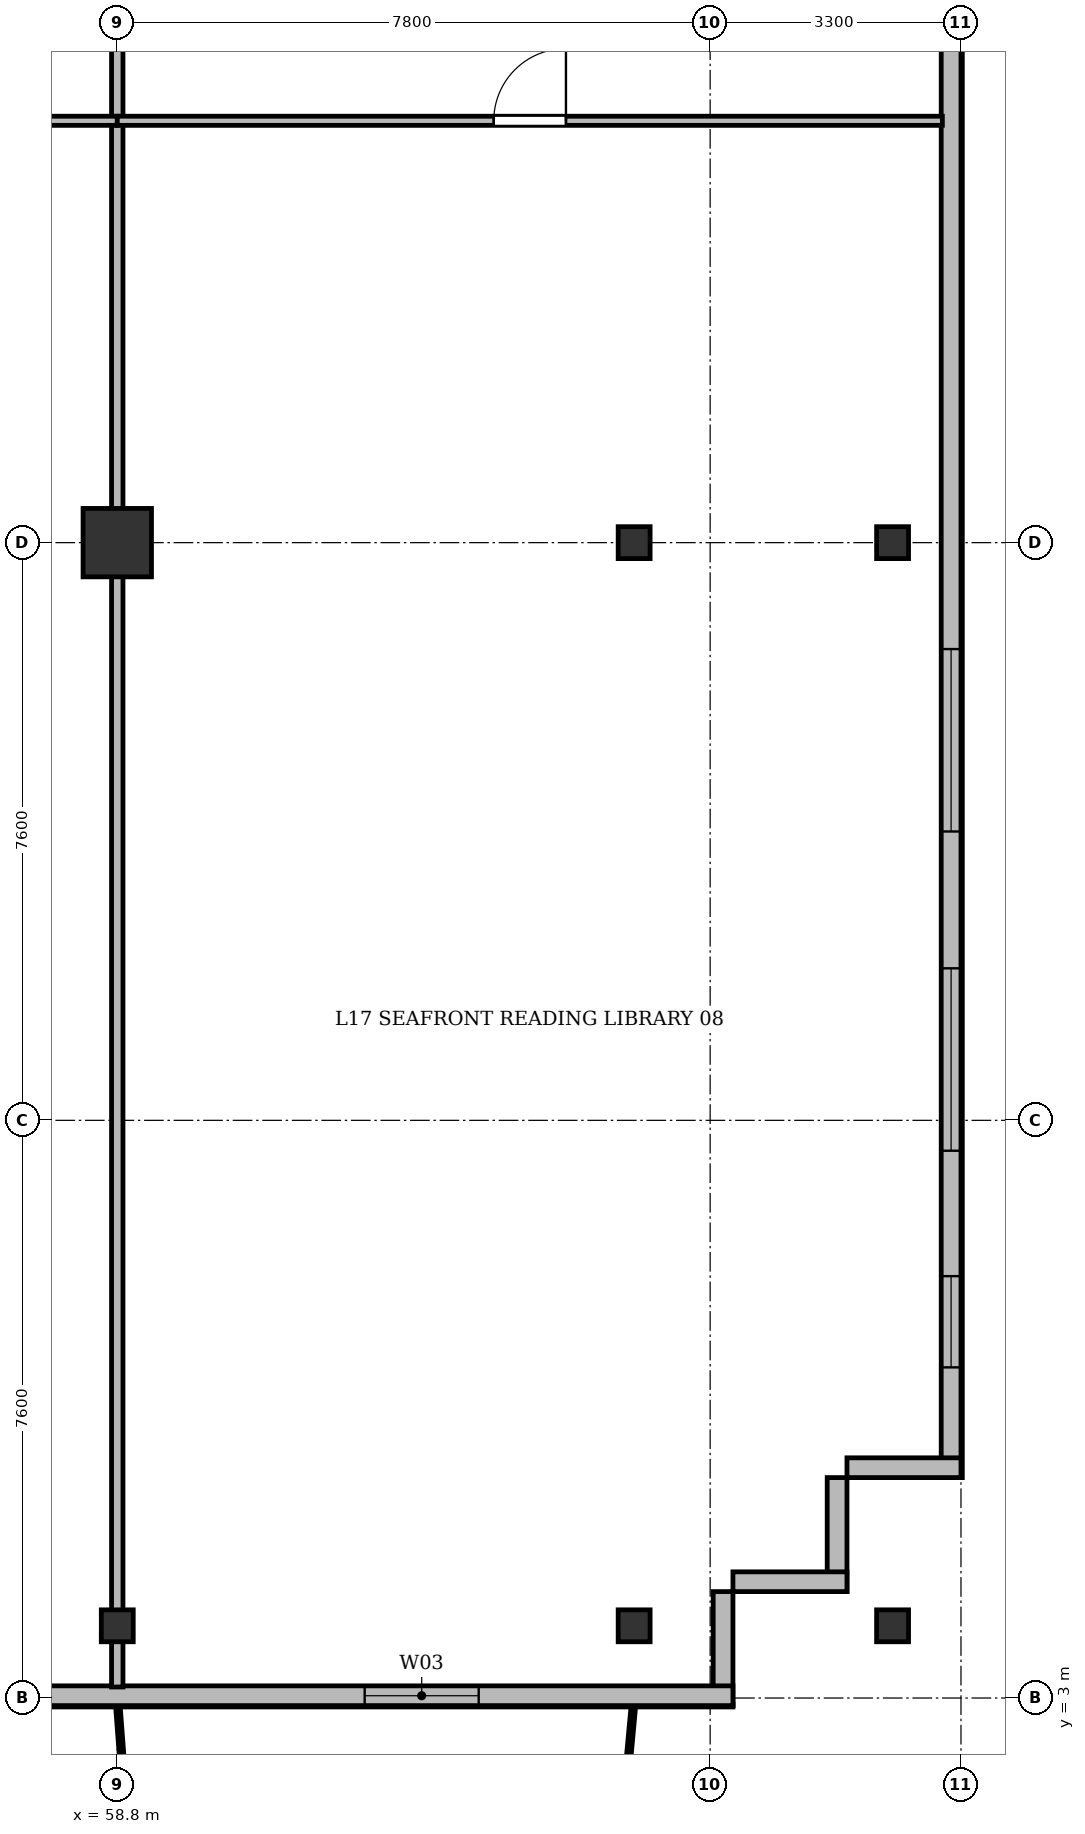
"""IFC4 building model, lengths in metres.
Left out: names, types, materials, properties, quantities, classifications, styles, units other than length and angle.
Written with IfcOpenShell. Run it as: python <this file> out.ifc"""

import sys

from ifc_helpers import new_model, si_unit, direction, frame, frame_2d, origin, origin_2d, place, context, subcontext, project, spatial, rectangle, i_section, extrude, source, transform, mapped, element, fill, save


model = new_model("IFC4")
c1 = context("Model", 3, precision=1e-05, world=origin(), true_north=direction((0.0, 1.0)))
c2 = subcontext(c1, "Body", "Model", "MODEL_VIEW")
j1 = project(units=[si_unit("LENGTHUNIT", "METRE"), si_unit("PLANEANGLEUNIT", "RADIAN")], contexts=[c1])
p1 = place(None, origin())
s1 = spatial("IfcSite", under=j1, at=p1, CompositionType="ELEMENT")
p2 = place(p1, origin())
s2 = spatial("IfcBuilding", under=s1, at=p2, CompositionType="ELEMENT")
p3 = place(p2, frame((0.0, 0.0, 66.7)))
s3 = spatial("IfcBuildingStorey", under=s2, at=p3, CompositionType="ELEMENT", Elevation=66.7)
m1 = source(origin(), c2, "Body", "SweptSolid", [
    extrude(i_section(OverallWidth=0.42, OverallDepth=0.42, WebThickness=0.026, FlangeThickness=0.04, at=origin_2d()), origin(), (0.0, 0.0, 1.0), 3.6),
])
p4 = place(p3, frame((58.8, 3.95, 0.0), z_axis=(0.0, 0.0, 1.0), x_axis=(1.0, 0.0, 0.0)))
e1 = element("IfcColumn", 1, at=p4, inside=s3, PredefinedType="COLUMN", context=c2, shape_type="MappedRepresentation", body=[
    mapped(m1, transform((0.0, 0.0, 0.0), x_axis=(1.0, 0.0, 0.0), y_axis=(0.0, 1.0, 0.0), z_axis=(0.0, 0.0, 1.0), scale=1.0)),
])
m2 = source(origin(), c2, "Body", "SweptSolid", [
    extrude(rectangle(XDim=0.9, YDim=0.9, at=origin_2d()), origin(), (0.0, 0.0, 1.0), 3.6),
])
p5 = place(p3, frame((58.8, 18.2, 0.0), z_axis=(0.0, 0.0, 1.0), x_axis=(1.0, 0.0, 0.0)))
e2 = element("IfcColumn", 2, at=p5, inside=s3, PredefinedType="COLUMN", context=c2, shape_type="MappedRepresentation", body=[
    mapped(m2, transform((0.0, 0.0, 0.0), x_axis=(1.0, 0.0, 0.0), y_axis=(0.0, 1.0, 0.0), z_axis=(0.0, 0.0, 1.0), scale=1.0)),
])
for number, where, z_axis, x_axis in (
    (3, (65.6, 3.95, 0.0), (0.0, 0.0, 1.0), (1.0, 0.0, 0.0)),
    (4, (65.6, 18.2, 0.0), (0.0, 0.0, 1.0), (1.0, 0.0, 0.0)),
    (5, (69.0, 3.95, 0.0), (0.0, 0.0, 1.0), (1.0, 0.0, 0.0)),
    (6, (69.0, 18.2, 0.0), (0.0, 0.0, 1.0), (1.0, 0.0, 0.0)),
):
    element("IfcColumn", number, at=place(p3, frame(where, z_axis=z_axis, x_axis=x_axis)), inside=s3, PredefinedType="COLUMN", context=c2, shape_type="MappedRepresentation", body=[
        mapped(m1, transform((0.0, 0.0, 0.0), x_axis=(1.0, 0.0, 0.0), y_axis=(0.0, 1.0, 0.0), z_axis=(0.0, 0.0, 1.0), scale=1.0)),
    ])
p6 = place(p3, frame((69.77, 45.5, 0.0), z_axis=(0.0, 0.0, 1.0), x_axis=(0.0, -1.0, 0.0)))
e7 = element("IfcWall", 7, at=p6, inside=s3, PredefinedType="SOLIDWALL", context=c2, shape_type="SweptSolid", body=[
    extrude(rectangle(XDim=39.6, YDim=0.26, at=frame_2d((19.8, 0.0))), origin(), (0.0, 0.0, 1.0), 3.34),
])
p7 = place(p6, frame((36.95, 0.0, 0.92)))
e8 = element("IfcOpeningElement", 8, at=p7, cuts=e7, PredefinedType="OPENING", context=c2, shape_type="SweptSolid", body=[
    extrude(rectangle(XDim=1.2, YDim=1.65, at=frame_2d((0.6, 0.825))), frame((0.0, 0.14, 0.0), z_axis=(0.0, -1.0, 0.0), x_axis=(1.0, 0.0, 0.0)), (0.0, 0.0, 1.0), 0.28),
])
p8 = place(p6, frame((32.9, 0.0, 0.92)))
e9 = element("IfcOpeningElement", 9, at=p8, cuts=e7, PredefinedType="OPENING", context=c2, shape_type="SweptSolid", body=[
    extrude(rectangle(XDim=2.4, YDim=2.1, at=frame_2d((1.2, 1.05))), frame((0.0, 0.14, 0.0), z_axis=(0.0, -1.0, 0.0), x_axis=(1.0, 0.0, 0.0)), (0.0, 0.0, 1.0), 0.28),
])
p9 = place(p6, frame((28.7, 0.0, 0.92)))
e10 = element("IfcOpeningElement", 10, at=p9, cuts=e7, PredefinedType="OPENING", context=c2, shape_type="SweptSolid", body=[
    extrude(rectangle(XDim=2.4, YDim=2.1, at=frame_2d((1.2, 1.05))), frame((0.0, 0.14, 0.0), z_axis=(0.0, -1.0, 0.0), x_axis=(1.0, 0.0, 0.0)), (0.0, 0.0, 1.0), 0.28),
])
p10 = place(p6, frame((7.5, 0.0, 0.92)))
e11 = element("IfcOpeningElement", 11, at=p10, cuts=e7, PredefinedType="OPENING", context=c2, shape_type="SweptSolid", body=[
    extrude(rectangle(XDim=2.4, YDim=2.1, at=frame_2d((1.2, 1.05))), frame((0.0, 0.14, 0.0), z_axis=(0.0, -1.0, 0.0), x_axis=(1.0, 0.0, 0.0)), (0.0, 0.0, 1.0), 0.28),
])
p11 = place(p6, frame((1.15, 0.0, 0.92)))
e12 = element("IfcOpeningElement", 12, at=p11, cuts=e7, PredefinedType="OPENING", context=c2, shape_type="SweptSolid", body=[
    extrude(rectangle(XDim=1.2, YDim=1.65, at=frame_2d((0.6, 0.825))), frame((0.0, 0.14, 0.0), z_axis=(0.0, -1.0, 0.0), x_axis=(1.0, 0.0, 0.0)), (0.0, 0.0, 1.0), 0.28),
])
p12 = place(p3, frame((69.9, 6.03, 0.0), z_axis=(0.0, 0.0, 1.0), x_axis=(-1.0, 0.0, 0.0)))
e13 = element("IfcWall", 13, at=p12, inside=s3, PredefinedType="SOLIDWALL", context=c2, shape_type="SweptSolid", body=[
    extrude(rectangle(XDim=1.5, YDim=0.26, at=frame_2d((0.75, 0.0))), origin(), (0.0, 0.0, 1.0), 2.752),
])
for number, where, z_axis, x_axis in (
    (14, (68.27, 5.9, 0.0), (0.0, 0.0, 1.0), (0.0, -1.0, 0.0)),
    (15, (68.4, 4.53, 0.0), (0.0, 0.0, 1.0), (-1.0, 0.0, 0.0)),
):
    element("IfcWall", number, at=place(p3, frame(where, z_axis=z_axis, x_axis=x_axis)), inside=s3, PredefinedType="SOLIDWALL", context=c2, shape_type="SweptSolid", body=[
        extrude(rectangle(XDim=1.5, YDim=0.26, at=frame_2d((0.75, 0.0))), origin(), (0.0, 0.0, 1.0), 3.34),
    ])
p13 = place(p3, frame((66.77, 4.4, 0.0), z_axis=(0.0, 0.0, 1.0), x_axis=(0.0, -1.0, 0.0)))
e16 = element("IfcWall", 16, at=p13, inside=s3, PredefinedType="SOLIDWALL", context=c2, shape_type="SweptSolid", body=[
    extrude(rectangle(XDim=1.5, YDim=0.26, at=frame_2d((0.75, 0.0))), origin(), (0.0, 0.0, 1.0), 2.69),
])
p14 = place(p3, frame((66.9, 3.03, 0.0), z_axis=(0.0, 0.0, 1.0), x_axis=(-1.0, 0.0, 0.0)))
e17 = element("IfcWall", 17, at=p14, inside=s3, PredefinedType="SOLIDWALL", context=c2, shape_type="SweptSolid", body=[
    extrude(rectangle(XDim=37.3, YDim=0.26, at=frame_2d((18.65, 0.0))), origin(), (0.0, 0.0, 1.0), 3.34),
])
p15 = place(p14, frame((3.345, 0.0, 0.9)))
e18 = element("IfcOpeningElement", 18, at=p15, cuts=e17, PredefinedType="OPENING", context=c2, shape_type="SweptSolid", body=[
    extrude(rectangle(XDim=1.5, YDim=1.75, at=frame_2d((0.75, 0.875))), frame((0.0, 0.14, 0.0), z_axis=(0.0, -1.0, 0.0), x_axis=(1.0, 0.0, 0.0)), (0.0, 0.0, 1.0), 0.28),
])
p16 = place(p14, frame((11.0, 0.0, 0.9)))
e19 = element("IfcOpeningElement", 19, at=p16, cuts=e17, PredefinedType="OPENING", context=c2, shape_type="SweptSolid", body=[
    extrude(rectangle(XDim=2.0, YDim=1.95, at=frame_2d((1.0, 0.975))), frame((0.0, 0.14, 0.0), z_axis=(0.0, -1.0, 0.0), x_axis=(1.0, 0.0, 0.0)), (0.0, 0.0, 1.0), 0.28),
])
p17 = place(p14, frame((17.007, 0.0, 0.0)))
e20 = element("IfcOpeningElement", 20, at=p17, cuts=e17, PredefinedType="OPENING", context=c2, shape_type="SweptSolid", body=[
    extrude(rectangle(XDim=1.2, YDim=2.2, at=frame_2d((0.6, 1.1))), frame((0.0, 0.14, 0.0), z_axis=(0.0, -1.0, 0.0), x_axis=(1.0, 0.0, 0.0)), (0.0, 0.0, 1.0), 0.28),
])
p18 = place(p14, frame((20.4, 0.0, 0.9)))
e21 = element("IfcOpeningElement", 21, at=p18, cuts=e17, PredefinedType="OPENING", context=c2, shape_type="SweptSolid", body=[
    extrude(rectangle(XDim=1.8, YDim=1.8, at=frame_2d((0.9, 0.9))), frame((0.0, 0.14, 0.0), z_axis=(0.0, -1.0, 0.0), x_axis=(1.0, 0.0, 0.0)), (0.0, 0.0, 1.0), 0.28),
])
p19 = place(p14, frame((28.6, 0.0, 0.9)))
e22 = element("IfcOpeningElement", 22, at=p19, cuts=e17, PredefinedType="OPENING", context=c2, shape_type="SweptSolid", body=[
    extrude(rectangle(XDim=2.2, YDim=1.8, at=frame_2d((1.1, 0.9))), frame((0.0, 0.14, 0.0), z_axis=(0.0, -1.0, 0.0), x_axis=(1.0, 0.0, 0.0)), (0.0, 0.0, 1.0), 0.28),
])
p20 = place(p3, frame((58.8, 3.145, 0.0), z_axis=(0.0, 0.0, 1.0), x_axis=(0.0, 1.0, 0.0)))
e23 = element("IfcWall", 23, at=p20, inside=s3, PredefinedType="PARTITIONING", context=c2, shape_type="SweptSolid", body=[
    extrude(rectangle(XDim=24.455, YDim=0.15, at=frame_2d((12.228, 0.0))), origin(), (0.0, 0.0, 1.0), 2.752),
])
p21 = place(p3, frame((51.0, 23.75, 0.0), z_axis=(0.0, 0.0, 1.0), x_axis=(1.0, 0.0, 0.0)))
e24 = element("IfcWall", 24, at=p21, inside=s3, PredefinedType="PARTITIONING", context=c2, shape_type="SweptSolid", body=[
    extrude(rectangle(XDim=7.8, YDim=0.12, at=frame_2d((3.9, 0.0))), origin(), (0.0, 0.0, 1.0), 2.752),
])
p22 = place(p21, frame((3.333, 0.0, 0.0)))
e25 = element("IfcOpeningElement", 25, at=p22, cuts=e24, PredefinedType="OPENING", context=c2, shape_type="SweptSolid", body=[
    extrude(rectangle(XDim=0.95, YDim=2.15, at=frame_2d((0.475, 1.075))), frame((0.0, 0.07, 0.0), z_axis=(0.0, -1.0, 0.0), x_axis=(1.0, 0.0, 0.0)), (0.0, 0.0, 1.0), 0.14),
])
p23 = place(p3, frame((58.8, 23.75, 0.0), z_axis=(0.0, 0.0, 1.0), x_axis=(1.0, 0.0, 0.0)))
e26 = element("IfcWall", 26, at=p23, inside=s3, PredefinedType="PARTITIONING", context=c2, shape_type="SweptSolid", body=[
    extrude(rectangle(XDim=10.855, YDim=0.12, at=frame_2d((5.427, 0.0))), origin(), (0.0, 0.0, 1.0), 2.752),
])
p24 = place(p23, frame((4.953, 0.0, 0.0)))
e27 = element("IfcOpeningElement", 27, at=p24, cuts=e26, PredefinedType="OPENING", context=c2, shape_type="SweptSolid", body=[
    extrude(rectangle(XDim=0.95, YDim=2.15, at=frame_2d((0.475, 1.075))), frame((0.0, 0.07, 0.0), z_axis=(0.0, -1.0, 0.0), x_axis=(1.0, 0.0, 0.0)), (0.0, 0.0, 1.0), 0.14),
])
m3 = source(origin(), c2, "Body", "SweptSolid", [
    extrude(rectangle(XDim=1.2, YDim=1.65, at=frame_2d((0.6, 0.825))), frame((0.0, 0.03, 0.0), z_axis=(0.0, -1.0, 0.0), x_axis=(1.0, 0.0, 0.0)), (0.0, 0.0, 1.0), 0.06),
])
p25 = place(p7, origin())
e28 = element("IfcWindow", 28, at=p25, inside=s3, PartitioningType="SINGLE_PANEL", PredefinedType="WINDOW", context=c2, shape_type="MappedRepresentation", body=[
    mapped(m3, transform((0.0, 0.0, 0.0), x_axis=(1.0, 0.0, 0.0), y_axis=(0.0, 1.0, 0.0), z_axis=(0.0, 0.0, 1.0), scale=1.0)),
])
fill(e8, e28)
m4 = source(origin(), c2, "Body", "SweptSolid", [
    extrude(rectangle(XDim=2.4, YDim=2.1, at=frame_2d((1.2, 1.05))), frame((0.0, 0.03, 0.0), z_axis=(0.0, -1.0, 0.0), x_axis=(1.0, 0.0, 0.0)), (0.0, 0.0, 1.0), 0.06),
])
p26 = place(p8, origin())
e29 = element("IfcWindow", 29, at=p26, inside=s3, PartitioningType="SINGLE_PANEL", PredefinedType="WINDOW", context=c2, shape_type="MappedRepresentation", body=[
    mapped(m4, transform((0.0, 0.0, 0.0), x_axis=(1.0, 0.0, 0.0), y_axis=(0.0, 1.0, 0.0), z_axis=(0.0, 0.0, 1.0), scale=1.0)),
])
fill(e9, e29)
p27 = place(p9, origin())
e30 = element("IfcWindow", 30, at=p27, inside=s3, PartitioningType="SINGLE_PANEL", PredefinedType="WINDOW", context=c2, shape_type="MappedRepresentation", body=[
    mapped(m4, transform((0.0, 0.0, 0.0), x_axis=(1.0, 0.0, 0.0), y_axis=(0.0, 1.0, 0.0), z_axis=(0.0, 0.0, 1.0), scale=1.0)),
])
fill(e10, e30)
m5 = source(origin(), c2, "Body", "SweptSolid", [
    extrude(rectangle(XDim=1.5, YDim=1.75, at=frame_2d((0.75, 0.875))), frame((0.0, 0.03, 0.0), z_axis=(0.0, -1.0, 0.0), x_axis=(1.0, 0.0, 0.0)), (0.0, 0.0, 1.0), 0.06),
])
p28 = place(p15, origin())
e31 = element("IfcWindow", 31, at=p28, inside=s3, PartitioningType="SINGLE_PANEL", PredefinedType="WINDOW", context=c2, shape_type="MappedRepresentation", body=[
    mapped(m5, transform((0.0, 0.0, 0.0), x_axis=(1.0, 0.0, 0.0), y_axis=(0.0, 1.0, 0.0), z_axis=(0.0, 0.0, 1.0), scale=1.0)),
])
fill(e18, e31)
m6 = source(origin(), c2, "Body", "SweptSolid", [
    extrude(rectangle(XDim=0.95, YDim=2.15, at=frame_2d((0.475, 1.075))), frame((0.0, 0.025, 0.0), z_axis=(0.0, -1.0, 0.0), x_axis=(1.0, 0.0, 0.0)), (0.0, 0.0, 1.0), 0.05),
])
p29 = place(p24, origin())
e32 = element("IfcDoor", 32, at=p29, inside=s3, OperationType="SINGLE_SWING_RIGHT", PredefinedType="DOOR", context=c2, shape_type="MappedRepresentation", body=[
    mapped(m6, transform((0.0, 0.0, 0.0), x_axis=(1.0, 0.0, 0.0), y_axis=(0.0, 1.0, 0.0), z_axis=(0.0, 0.0, 1.0), scale=1.0)),
])
fill(e27, e32)
save(model, sys.argv[1])
